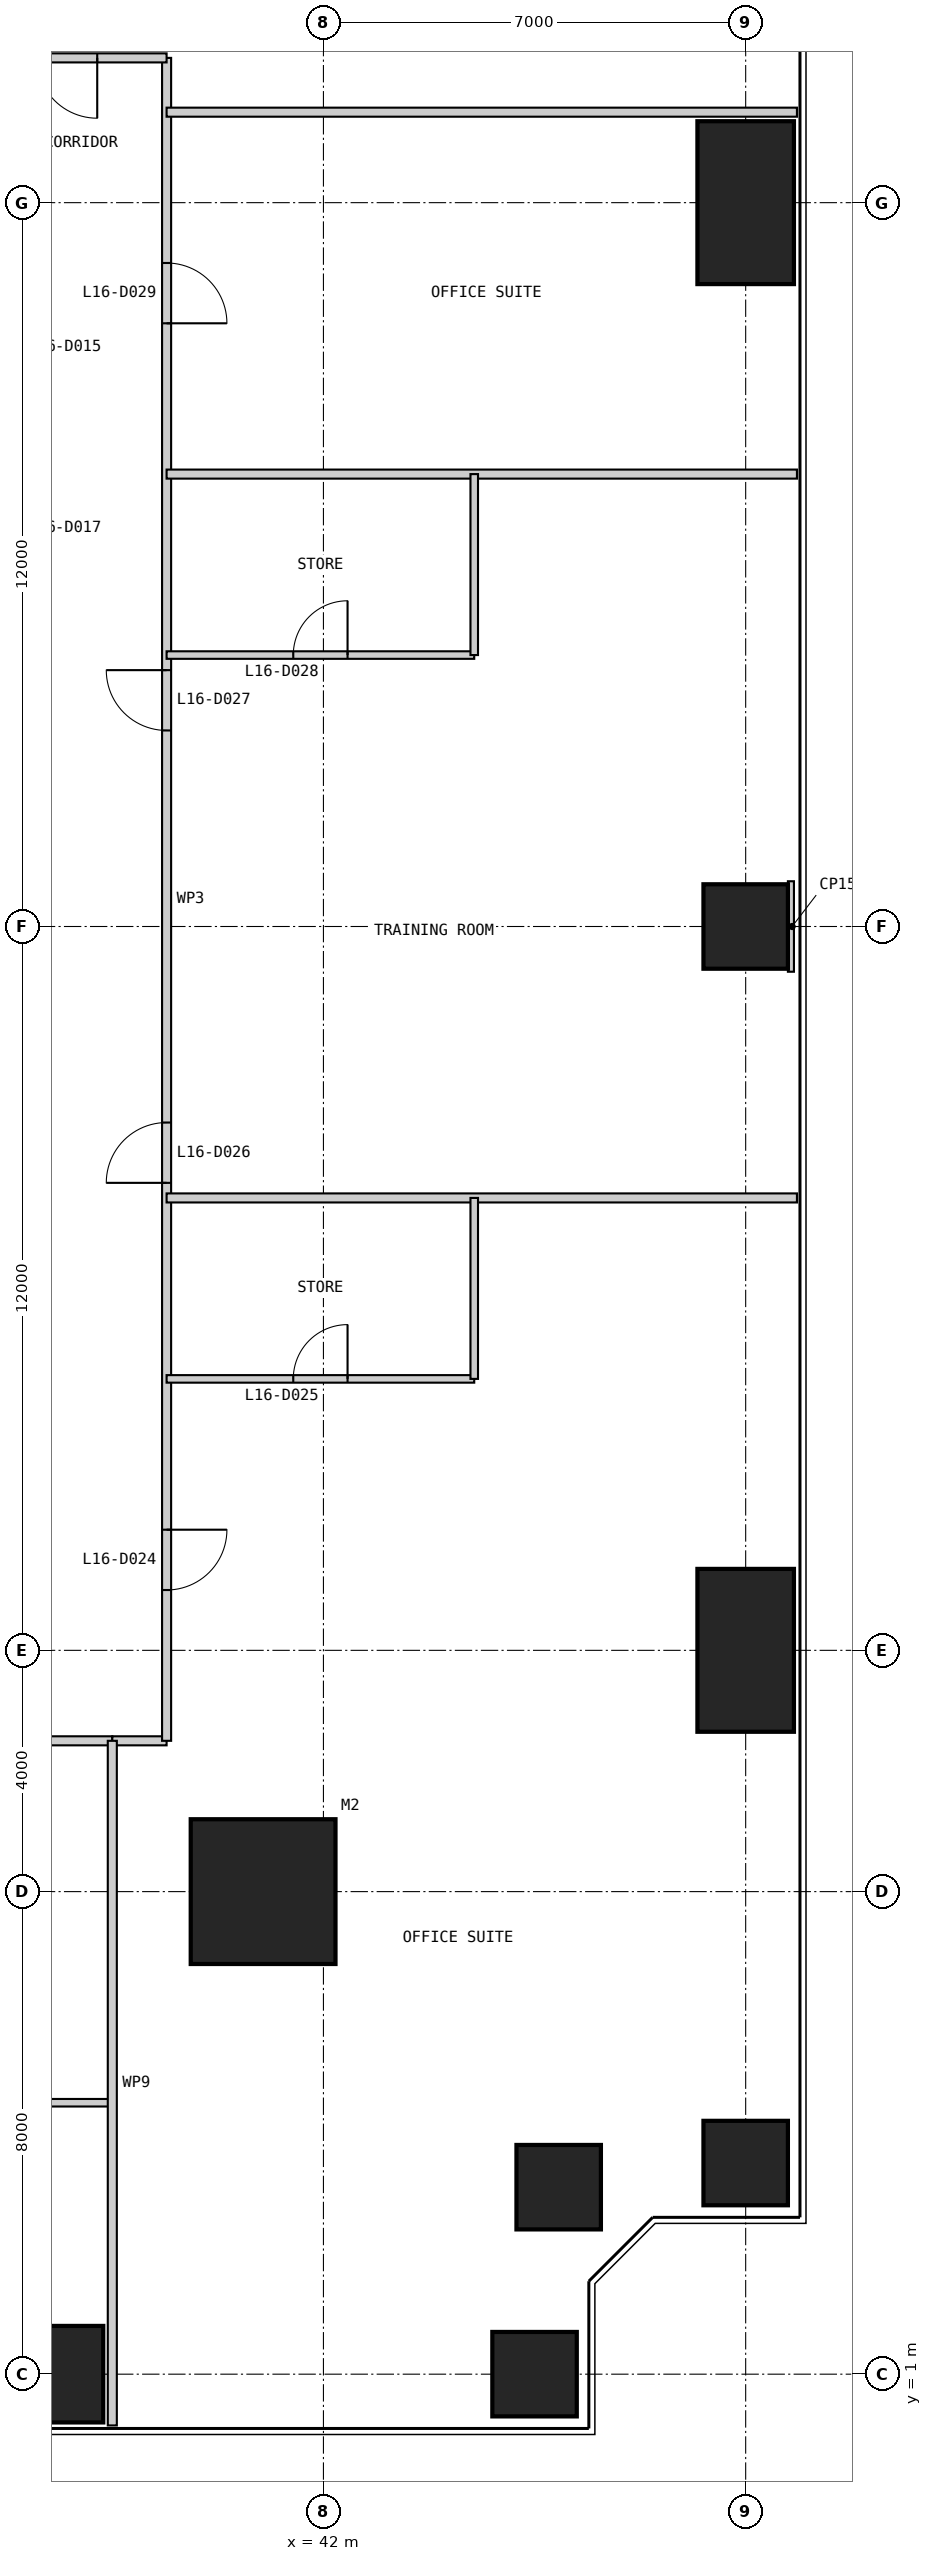
"""IFC4 building model, lengths in metres.
Left out: names, types, materials, properties, quantities, classifications, styles, units other than length and angle.
Written with IfcOpenShell. Run it as: python <this file> out.ifc"""

import sys

from ifc_helpers import new_model, si_unit, direction, frame, frame_2d, origin, origin_2d, place, context, subcontext, project, spatial, rectangle, extrude, element, fill, save


model = new_model("IFC4")
c1 = context("Model", 3, precision=1e-05, world=origin(), true_north=direction((0.0, 1.0)))
c2 = subcontext(c1, "Body", "Model", "MODEL_VIEW")
j1 = project(units=[si_unit("LENGTHUNIT", "METRE"), si_unit("PLANEANGLEUNIT", "RADIAN")], contexts=[c1])
p1 = place(None, origin())
s1 = spatial("IfcSite", under=j1, at=p1, CompositionType="ELEMENT")
p2 = place(p1, origin())
s2 = spatial("IfcBuilding", under=s1, at=p2, CompositionType="ELEMENT")
p3 = place(p2, frame((0.0, 0.0, 71.0)))
s3 = spatial("IfcBuildingStorey", under=s2, at=p3, CompositionType="ELEMENT", Elevation=71.0)
p4 = place(p3, frame((41.0, 9.0, 0.0), z_axis=(0.0, 0.0, 1.0), x_axis=(1.0, 0.0, 0.0)))
e1 = element("IfcColumn", 1, at=p4, inside=s3, PredefinedType="COLUMN", context=c2, shape_type="SweptSolid", body=[
    extrude(rectangle(XDim=2.4, YDim=2.4, at=origin_2d()), origin(), (0.0, 0.0, 1.0), 4.0),
])
p5 = place(p3, frame((37.0, 1.0, 0.0), z_axis=(0.0, 0.0, 1.0), x_axis=(1.0, 0.0, 0.0)))
e2 = element("IfcColumn", 2, at=p5, inside=s3, PredefinedType="COLUMN", context=c2, shape_type="SweptSolid", body=[
    extrude(rectangle(XDim=2.7, YDim=1.6, at=origin_2d()), origin(), (0.0, 0.0, 1.0), 4.0),
])
for number, where, z_axis, x_axis in (
    (3, (45.5, 1.0, 0.0), (0.0, 0.0, 1.0), (1.0, 0.0, 0.0)),
    (4, (45.9, 4.1, 0.0), (0.0, 0.0, 1.0), (1.0, 0.0, 0.0)),
    (5, (49.0, 4.5, 0.0), (0.0, 0.0, 1.0), (1.0, 0.0, 0.0)),
):
    element("IfcColumn", number, at=place(p3, frame(where, z_axis=z_axis, x_axis=x_axis)), inside=s3, PredefinedType="COLUMN", context=c2, shape_type="SweptSolid", body=[
        extrude(rectangle(XDim=1.4, YDim=1.4, at=origin_2d()), origin(), (0.0, 0.0, 1.0), 4.0),
    ])
p6 = place(p3, frame((49.0, 13.0, 0.0), z_axis=(0.0, 0.0, 1.0), x_axis=(1.0, 0.0, 0.0)))
e6 = element("IfcColumn", 6, at=p6, inside=s3, PredefinedType="COLUMN", context=c2, shape_type="SweptSolid", body=[
    extrude(rectangle(XDim=1.6, YDim=2.7, at=origin_2d()), origin(), (0.0, 0.0, 1.0), 4.0),
])
p7 = place(p3, frame((49.0, 25.0, 0.0), z_axis=(0.0, 0.0, 1.0), x_axis=(1.0, 0.0, 0.0)))
e7 = element("IfcColumn", 7, at=p7, inside=s3, PredefinedType="COLUMN", context=c2, shape_type="SweptSolid", body=[
    extrude(rectangle(XDim=1.4, YDim=1.4, at=origin_2d()), origin(), (0.0, 0.0, 1.0), 4.0),
])
p8 = place(p3, frame((49.0, 37.0, 0.0), z_axis=(0.0, 0.0, 1.0), x_axis=(1.0, 0.0, 0.0)))
e8 = element("IfcColumn", 8, at=p8, inside=s3, PredefinedType="COLUMN", context=c2, shape_type="SweptSolid", body=[
    extrude(rectangle(XDim=1.6, YDim=2.7, at=origin_2d()), origin(), (0.0, 0.0, 1.0), 4.0),
])
p9 = place(p3, frame((11.5, 11.5, 0.0), z_axis=(0.0, 0.0, 1.0), x_axis=(1.0, 0.0, 0.0)))
e9 = element("IfcWall", 9, at=p9, inside=s3, PredefinedType="PARTITIONING", context=c2, shape_type="SweptSolid", body=[
    extrude(rectangle(XDim=27.0, YDim=0.15, at=frame_2d((13.5, 0.0))), origin(), (0.0, 0.0, 1.0), 3.85),
])
p10 = place(p9, frame((1.0, 0.0, 0.0)))
e10 = element("IfcOpeningElement", 10, at=p10, cuts=e9, PredefinedType="OPENING", context=c2, shape_type="SweptSolid", body=[
    extrude(rectangle(XDim=1.0, YDim=2.2, at=frame_2d((0.5, 1.1))), frame((0.0, 0.085, 0.0), z_axis=(0.0, -1.0, 0.0), x_axis=(1.0, 0.0, 0.0)), (0.0, 0.0, 1.0), 0.17),
])
p11 = place(p9, frame((5.5, 0.0, 0.0)))
e11 = element("IfcOpeningElement", 11, at=p11, cuts=e9, PredefinedType="OPENING", context=c2, shape_type="SweptSolid", body=[
    extrude(rectangle(XDim=1.0, YDim=2.2, at=frame_2d((0.5, 1.1))), frame((0.0, 0.085, 0.0), z_axis=(0.0, -1.0, 0.0), x_axis=(1.0, 0.0, 0.0)), (0.0, 0.0, 1.0), 0.17),
])
p12 = place(p9, frame((11.5, 0.0, 0.0)))
e12 = element("IfcOpeningElement", 12, at=p12, cuts=e9, PredefinedType="OPENING", context=c2, shape_type="SweptSolid", body=[
    extrude(rectangle(XDim=1.0, YDim=2.2, at=frame_2d((0.5, 1.1))), frame((0.0, 0.085, 0.0), z_axis=(0.0, -1.0, 0.0), x_axis=(1.0, 0.0, 0.0)), (0.0, 0.0, 1.0), 0.17),
])
p13 = place(p9, frame((19.0, 0.0, 0.0)))
e13 = element("IfcOpeningElement", 13, at=p13, cuts=e9, PredefinedType="OPENING", context=c2, shape_type="SweptSolid", body=[
    extrude(rectangle(XDim=1.0, YDim=2.2, at=frame_2d((0.5, 1.1))), frame((0.0, 0.085, 0.0), z_axis=(0.0, -1.0, 0.0), x_axis=(1.0, 0.0, 0.0)), (0.0, 0.0, 1.0), 0.17),
])
p14 = place(p3, frame((32.5, 5.5, 0.0), z_axis=(0.0, 0.0, 1.0), x_axis=(1.0, 0.0, 0.0)))
e14 = element("IfcWall", 14, at=p14, inside=s3, PredefinedType="PARTITIONING", context=c2, shape_type="SweptSolid", body=[
    extrude(rectangle(XDim=6.0, YDim=0.125, at=frame_2d((3.0, 0.0))), origin(), (0.0, 0.0, 1.0), 3.85),
])
p15 = place(p3, frame((38.5, 11.5, 0.0), z_axis=(0.0, 0.0, 1.0), x_axis=(1.0, 0.0, 0.0)))
e15 = element("IfcWall", 15, at=p15, inside=s3, PredefinedType="PARTITIONING", context=c2, shape_type="SweptSolid", body=[
    extrude(rectangle(XDim=0.9, YDim=0.15, at=frame_2d((0.45, 0.0))), origin(), (0.0, 0.0, 1.0), 3.85),
])
p16 = place(p3, frame((39.4, 11.5, 0.0), z_axis=(0.0, 0.0, 1.0), x_axis=(0.0, 1.0, 0.0)))
e16 = element("IfcWall", 16, at=p16, inside=s3, PredefinedType="PARTITIONING", context=c2, shape_type="SweptSolid", body=[
    extrude(rectangle(XDim=27.9, YDim=0.15, at=frame_2d((13.95, 0.0))), origin(), (0.0, 0.0, 1.0), 3.85),
])
p17 = place(p16, frame((2.5, 0.0, 0.0)))
e17 = element("IfcOpeningElement", 17, at=p17, cuts=e16, PredefinedType="OPENING", context=c2, shape_type="SweptSolid", body=[
    extrude(rectangle(XDim=1.0, YDim=2.2, at=frame_2d((0.5, 1.1))), frame((0.0, 0.085, 0.0), z_axis=(0.0, -1.0, 0.0), x_axis=(1.0, 0.0, 0.0)), (0.0, 0.0, 1.0), 0.17),
])
p18 = place(p16, frame((9.25, 0.0, 0.0)))
e18 = element("IfcOpeningElement", 18, at=p18, cuts=e16, PredefinedType="OPENING", context=c2, shape_type="SweptSolid", body=[
    extrude(rectangle(XDim=1.0, YDim=2.2, at=frame_2d((0.5, 1.1))), frame((0.0, 0.085, 0.0), z_axis=(0.0, -1.0, 0.0), x_axis=(1.0, 0.0, 0.0)), (0.0, 0.0, 1.0), 0.17),
])
p19 = place(p16, frame((16.75, 0.0, 0.0)))
e19 = element("IfcOpeningElement", 19, at=p19, cuts=e16, PredefinedType="OPENING", context=c2, shape_type="SweptSolid", body=[
    extrude(rectangle(XDim=1.0, YDim=2.2, at=frame_2d((0.5, 1.1))), frame((0.0, 0.085, 0.0), z_axis=(0.0, -1.0, 0.0), x_axis=(1.0, 0.0, 0.0)), (0.0, 0.0, 1.0), 0.17),
])
p20 = place(p16, frame((23.5, 0.0, 0.0)))
e20 = element("IfcOpeningElement", 20, at=p20, cuts=e16, PredefinedType="OPENING", context=c2, shape_type="SweptSolid", body=[
    extrude(rectangle(XDim=1.0, YDim=2.2, at=frame_2d((0.5, 1.1))), frame((0.0, 0.085, 0.0), z_axis=(0.0, -1.0, 0.0), x_axis=(1.0, 0.0, 0.0)), (0.0, 0.0, 1.0), 0.17),
])
p21 = place(p3, frame((38.5, 0.15, 0.0), z_axis=(0.0, 0.0, 1.0), x_axis=(0.0, 1.0, 0.0)))
e21 = element("IfcWall", 21, at=p21, inside=s3, PredefinedType="PARTITIONING", context=c2, shape_type="SweptSolid", body=[
    extrude(rectangle(XDim=11.35, YDim=0.15, at=frame_2d((5.675, 0.0))), origin(), (0.0, 0.0, 1.0), 3.85),
])
p22 = place(p3, frame((44.5, 17.5, 0.0), z_axis=(0.0, 0.0, 1.0), x_axis=(-1.0, 0.0, 0.0)))
e22 = element("IfcWall", 22, at=p22, inside=s3, PredefinedType="PARTITIONING", context=c2, shape_type="SweptSolid", body=[
    extrude(rectangle(XDim=5.1, YDim=0.125, at=frame_2d((2.55, 0.0))), origin(), (0.0, 0.0, 1.0), 3.85),
])
p23 = place(p22, frame((2.1, 0.0, 0.0)))
e23 = element("IfcOpeningElement", 23, at=p23, cuts=e22, PredefinedType="OPENING", context=c2, shape_type="SweptSolid", body=[
    extrude(rectangle(XDim=0.9, YDim=2.2, at=frame_2d((0.45, 1.1))), frame((0.0, 0.073, 0.0), z_axis=(0.0, -1.0, 0.0), x_axis=(1.0, 0.0, 0.0)), (0.0, 0.0, 1.0), 0.145),
])
p24 = place(p3, frame((49.85, 20.5, 0.0), z_axis=(0.0, 0.0, 1.0), x_axis=(-1.0, 0.0, 0.0)))
e24 = element("IfcWall", 24, at=p24, inside=s3, PredefinedType="PARTITIONING", context=c2, shape_type="SweptSolid", body=[
    extrude(rectangle(XDim=10.45, YDim=0.15, at=frame_2d((5.225, 0.0))), origin(), (0.0, 0.0, 1.0), 3.85),
])
p25 = place(p3, frame((44.5, 29.5, 0.0), z_axis=(0.0, 0.0, 1.0), x_axis=(-1.0, 0.0, 0.0)))
e25 = element("IfcWall", 25, at=p25, inside=s3, PredefinedType="PARTITIONING", context=c2, shape_type="SweptSolid", body=[
    extrude(rectangle(XDim=5.1, YDim=0.125, at=frame_2d((2.55, 0.0))), origin(), (0.0, 0.0, 1.0), 3.85),
])
p26 = place(p25, frame((2.1, 0.0, 0.0)))
e26 = element("IfcOpeningElement", 26, at=p26, cuts=e25, PredefinedType="OPENING", context=c2, shape_type="SweptSolid", body=[
    extrude(rectangle(XDim=0.9, YDim=2.2, at=frame_2d((0.45, 1.1))), frame((0.0, 0.073, 0.0), z_axis=(0.0, -1.0, 0.0), x_axis=(1.0, 0.0, 0.0)), (0.0, 0.0, 1.0), 0.145),
])
p27 = place(p3, frame((49.85, 32.5, 0.0), z_axis=(0.0, 0.0, 1.0), x_axis=(-1.0, 0.0, 0.0)))
e27 = element("IfcWall", 27, at=p27, inside=s3, PredefinedType="PARTITIONING", context=c2, shape_type="SweptSolid", body=[
    extrude(rectangle(XDim=10.45, YDim=0.15, at=frame_2d((5.225, 0.0))), origin(), (0.0, 0.0, 1.0), 3.85),
])
for number, where, z_axis, x_axis in (
    (28, (44.5, 17.5, 0.0), (0.0, 0.0, 1.0), (0.0, 1.0, 0.0)),
    (29, (44.5, 29.5, 0.0), (0.0, 0.0, 1.0), (0.0, 1.0, 0.0)),
):
    element("IfcWall", number, at=place(p3, frame(where, z_axis=z_axis, x_axis=x_axis)), inside=s3, PredefinedType="PARTITIONING", context=c2, shape_type="SweptSolid", body=[
        extrude(rectangle(XDim=3.0, YDim=0.125, at=frame_2d((1.5, 0.0))), origin(), (0.0, 0.0, 1.0), 3.85),
    ])
p28 = place(p3, frame((39.4, 39.4, 0.0), z_axis=(0.0, 0.0, 1.0), x_axis=(-1.0, 0.0, 0.0)))
e30 = element("IfcWall", 30, at=p28, inside=s3, PredefinedType="PARTITIONING", context=c2, shape_type="SweptSolid", body=[
    extrude(rectangle(XDim=27.9, YDim=0.15, at=frame_2d((13.95, 0.0))), origin(), (0.0, 0.0, 1.0), 3.85),
])
p29 = place(p28, frame((1.15, 0.0, 0.0)))
e31 = element("IfcOpeningElement", 31, at=p29, cuts=e30, PredefinedType="OPENING", context=c2, shape_type="SweptSolid", body=[
    extrude(rectangle(XDim=1.0, YDim=2.2, at=frame_2d((0.5, 1.1))), frame((0.0, 0.085, 0.0), z_axis=(0.0, -1.0, 0.0), x_axis=(1.0, 0.0, 0.0)), (0.0, 0.0, 1.0), 0.17),
])
p30 = place(p28, frame((23.65, 0.0, 0.0)))
e32 = element("IfcOpeningElement", 32, at=p30, cuts=e30, PredefinedType="OPENING", context=c2, shape_type="SweptSolid", body=[
    extrude(rectangle(XDim=1.0, YDim=2.2, at=frame_2d((0.5, 1.1))), frame((0.0, 0.085, 0.0), z_axis=(0.0, -1.0, 0.0), x_axis=(1.0, 0.0, 0.0)), (0.0, 0.0, 1.0), 0.17),
])
p31 = place(p3, frame((49.85, 38.5, 0.0), z_axis=(0.0, 0.0, 1.0), x_axis=(-1.0, 0.0, 0.0)))
e33 = element("IfcWall", 33, at=p31, inside=s3, PredefinedType="PARTITIONING", context=c2, shape_type="SweptSolid", body=[
    extrude(rectangle(XDim=10.45, YDim=0.15, at=frame_2d((5.225, 0.0))), origin(), (0.0, 0.0, 1.0), 3.85),
])
p32 = place(p3, frame((49.8, 25.0, 0.0), z_axis=(0.0, 0.0, 1.0), x_axis=(-1.0, 0.0, 0.0)))
e34 = element("IfcWall", 34, at=p32, inside=s3, PredefinedType="PARTITIONING", context=c2, shape_type="SweptSolid", body=[
    extrude(rectangle(XDim=0.1, YDim=1.5, at=frame_2d((0.05, 0.0))), origin(), (0.0, 0.0, 1.0), 3.85),
])
p33 = place(p17, frame((1.0, 0.0, 0.0), z_axis=(0.0, 0.0, 1.0), x_axis=(-1.0, 0.0, 0.0)))
e35 = element("IfcDoor", 35, at=p33, inside=s3, OperationType="SINGLE_SWING_LEFT", PredefinedType="DOOR", context=c2, shape_type="SweptSolid", body=[
    extrude(rectangle(XDim=1.0, YDim=2.2, at=frame_2d((0.5, 1.1))), frame((0.0, 0.025, 0.0), z_axis=(0.0, -1.0, 0.0), x_axis=(1.0, 0.0, 0.0)), (0.0, 0.0, 1.0), 0.05),
])
fill(e17, e35)
p34 = place(p23, frame((0.9, 0.0, 0.0), z_axis=(0.0, 0.0, 1.0), x_axis=(-1.0, 0.0, 0.0)))
e36 = element("IfcDoor", 36, at=p34, inside=s3, OperationType="SINGLE_SWING_RIGHT", PredefinedType="DOOR", context=c2, shape_type="SweptSolid", body=[
    extrude(rectangle(XDim=0.9, YDim=2.2, at=frame_2d((0.45, 1.1))), frame((0.0, 0.025, 0.0), z_axis=(0.0, -1.0, 0.0), x_axis=(1.0, 0.0, 0.0)), (0.0, 0.0, 1.0), 0.05),
])
fill(e23, e36)
p35 = place(p18, origin())
e37 = element("IfcDoor", 37, at=p35, inside=s3, OperationType="SINGLE_SWING_LEFT", PredefinedType="DOOR", context=c2, shape_type="SweptSolid", body=[
    extrude(rectangle(XDim=1.0, YDim=2.2, at=frame_2d((0.5, 1.1))), frame((0.0, 0.025, 0.0), z_axis=(0.0, -1.0, 0.0), x_axis=(1.0, 0.0, 0.0)), (0.0, 0.0, 1.0), 0.05),
])
fill(e18, e37)
p36 = place(p19, origin())
e38 = element("IfcDoor", 38, at=p36, inside=s3, OperationType="SINGLE_SWING_RIGHT", PredefinedType="DOOR", context=c2, shape_type="SweptSolid", body=[
    extrude(rectangle(XDim=1.0, YDim=2.2, at=frame_2d((0.5, 1.1))), frame((0.0, 0.025, 0.0), z_axis=(0.0, -1.0, 0.0), x_axis=(1.0, 0.0, 0.0)), (0.0, 0.0, 1.0), 0.05),
])
fill(e19, e38)
p37 = place(p26, frame((0.9, 0.0, 0.0), z_axis=(0.0, 0.0, 1.0), x_axis=(-1.0, 0.0, 0.0)))
e39 = element("IfcDoor", 39, at=p37, inside=s3, OperationType="SINGLE_SWING_RIGHT", PredefinedType="DOOR", context=c2, shape_type="SweptSolid", body=[
    extrude(rectangle(XDim=0.9, YDim=2.2, at=frame_2d((0.45, 1.1))), frame((0.0, 0.025, 0.0), z_axis=(0.0, -1.0, 0.0), x_axis=(1.0, 0.0, 0.0)), (0.0, 0.0, 1.0), 0.05),
])
fill(e26, e39)
p38 = place(p20, frame((1.0, 0.0, 0.0), z_axis=(0.0, 0.0, 1.0), x_axis=(-1.0, 0.0, 0.0)))
e40 = element("IfcDoor", 40, at=p38, inside=s3, OperationType="SINGLE_SWING_RIGHT", PredefinedType="DOOR", context=c2, shape_type="SweptSolid", body=[
    extrude(rectangle(XDim=1.0, YDim=2.2, at=frame_2d((0.5, 1.1))), frame((0.0, 0.025, 0.0), z_axis=(0.0, -1.0, 0.0), x_axis=(1.0, 0.0, 0.0)), (0.0, 0.0, 1.0), 0.05),
])
fill(e20, e40)
p39 = place(p29, origin())
e41 = element("IfcDoor", 41, at=p39, inside=s3, OperationType="SINGLE_SWING_LEFT", PredefinedType="DOOR", context=c2, shape_type="SweptSolid", body=[
    extrude(rectangle(XDim=1.0, YDim=2.2, at=frame_2d((0.5, 1.1))), frame((0.0, 0.025, 0.0), z_axis=(0.0, -1.0, 0.0), x_axis=(1.0, 0.0, 0.0)), (0.0, 0.0, 1.0), 0.05),
])
fill(e31, e41)
save(model, sys.argv[1])
